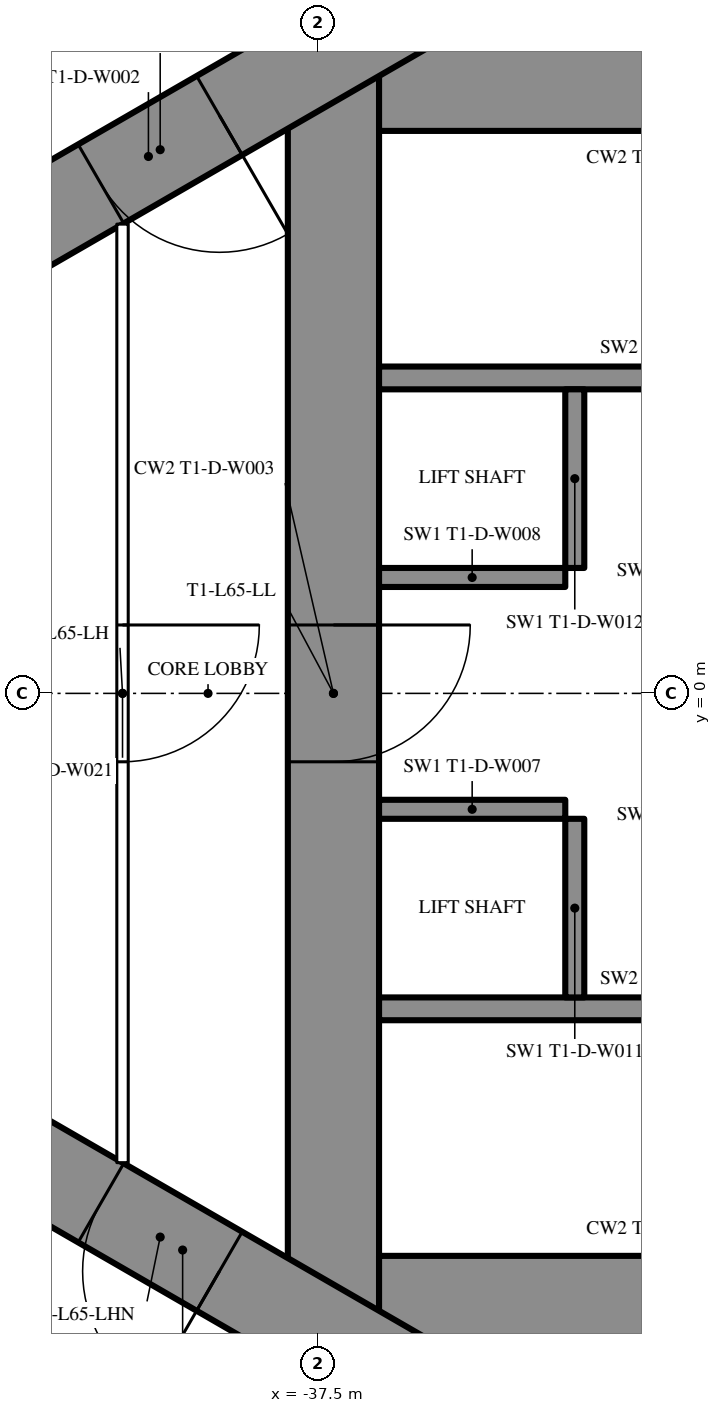
"""IFC4 building model, lengths in metres.
Left out: names, types, materials, properties, quantities, classifications, styles, units other than length and angle.
Written with IfcOpenShell. Run it as: python <this file> out.ifc"""

import sys

from ifc_helpers import new_model, si_unit, direction, frame, frame_2d, origin, place, context, subcontext, project, spatial, rectangle, extrude, element, fill, save


model = new_model("IFC4")
c1 = context("Model", 3, precision=1e-05, world=origin(), true_north=direction((0.0, 1.0)))
c2 = subcontext(c1, "Body", "Model", "MODEL_VIEW")
j1 = project(units=[si_unit("LENGTHUNIT", "METRE"), si_unit("PLANEANGLEUNIT", "RADIAN")], contexts=[c1])
p1 = place(None, origin())
s1 = spatial("IfcSite", under=j1, at=p1, CompositionType="ELEMENT")
p2 = place(p1, origin())
s2 = spatial("IfcBuilding", under=s1, at=p2, CompositionType="ELEMENT")
p3 = place(p2, frame((0.0, 0.0, 244.1)))
s3 = spatial("IfcBuildingStorey", under=s2, at=p3, CompositionType="ELEMENT", Elevation=244.1)
p4 = place(p3, frame((-37.3, 8.6, 0.0), z_axis=(0.0, 0.0, 1.0), x_axis=(0.0, -1.0, 0.0)))
e1 = element("IfcWall", 1, at=p4, inside=s3, PredefinedType="SHEAR", context=c2, shape_type="SweptSolid", body=[
    extrude(rectangle(XDim=17.2, YDim=1.2, at=frame_2d((8.6, 0.0))), origin(), (0.0, 0.0, 1.0), 3.6),
])
p5 = place(p4, frame((7.7, 0.0, 0.0)))
e2 = element("IfcOpeningElement", 2, at=p5, cuts=e1, PredefinedType="OPENING", context=c2, shape_type="SweptSolid", body=[
    extrude(rectangle(XDim=1.8, YDim=2.2, at=frame_2d((0.9, 1.1))), frame((0.0, 0.61, 0.0), z_axis=(0.0, -1.0, 0.0), x_axis=(1.0, 0.0, 0.0)), (0.0, 0.0, 1.0), 1.22),
])
p6 = place(p3, frame((-28.3, 8.0, 0.0), z_axis=(0.0, 0.0, 1.0), x_axis=(-1.0, 0.0, 0.0)))
e3 = element("IfcWall", 3, at=p6, inside=s3, PredefinedType="SHEAR", context=c2, shape_type="SweptSolid", body=[
    extrude(rectangle(XDim=8.4, YDim=1.2, at=frame_2d((4.2, 0.0))), origin(), (0.0, 0.0, 1.0), 3.6),
])
p7 = place(p6, frame((0.25, 0.0, 0.0)))
e4 = element("IfcOpeningElement", 4, at=p7, cuts=e3, PredefinedType="OPENING", context=c2, shape_type="SweptSolid", body=[
    extrude(rectangle(XDim=1.0, YDim=2.2, at=frame_2d((0.5, 1.1))), frame((0.0, 0.61, 0.0), z_axis=(0.0, -1.0, 0.0), x_axis=(1.0, 0.0, 0.0)), (0.0, 0.0, 1.0), 1.22),
])
p8 = place(p3, frame((-28.3, -8.0, 0.0), z_axis=(0.0, 0.0, 1.0), x_axis=(-1.0, 0.0, 0.0)))
e5 = element("IfcWall", 5, at=p8, inside=s3, PredefinedType="SHEAR", context=c2, shape_type="SweptSolid", body=[
    extrude(rectangle(XDim=8.4, YDim=1.2, at=frame_2d((4.2, 0.0))), origin(), (0.0, 0.0, 1.0), 3.6),
])
p9 = place(p8, frame((0.25, 0.0, 0.0)))
e6 = element("IfcOpeningElement", 6, at=p9, cuts=e5, PredefinedType="OPENING", context=c2, shape_type="SweptSolid", body=[
    extrude(rectangle(XDim=1.0, YDim=2.2, at=frame_2d((0.5, 1.1))), frame((0.0, 0.61, 0.0), z_axis=(0.0, -1.0, 0.0), x_axis=(1.0, 0.0, 0.0)), (0.0, 0.0, 1.0), 1.22),
])
for number, where, z_axis, x_axis in (
    (7, (-28.3, 4.15, 0.0), (0.0, 0.0, 1.0), (-1.0, 0.0, 0.0)),
    (8, (-28.3, -4.15, 0.0), (0.0, 0.0, 1.0), (-1.0, 0.0, 0.0)),
):
    element("IfcWall", number, at=place(p3, frame(where, z_axis=z_axis, x_axis=x_axis)), inside=s3, PredefinedType="SHEAR", context=c2, shape_type="SweptSolid", body=[
        extrude(rectangle(XDim=8.4, YDim=0.3, at=frame_2d((4.2, 0.0))), origin(), (0.0, 0.0, 1.0), 3.6),
    ])
p10 = place(p3, frame((-34.125, 4.0, 0.0), z_axis=(0.0, 0.0, 1.0), x_axis=(0.0, -1.0, 0.0)))
e9 = element("IfcWall", 9, at=p10, inside=s3, PredefinedType="SHEAR", context=c2, shape_type="SweptSolid", body=[
    extrude(rectangle(XDim=2.35, YDim=0.25, at=frame_2d((1.175, 0.0))), origin(), (0.0, 0.0, 1.0), 3.6),
])
p11 = place(p3, frame((-34.25, 1.525, 0.0), z_axis=(0.0, 0.0, 1.0), x_axis=(-1.0, 0.0, 0.0)))
e10 = element("IfcWall", 10, at=p11, inside=s3, PredefinedType="SHEAR", context=c2, shape_type="SweptSolid", body=[
    extrude(rectangle(XDim=2.45, YDim=0.25, at=frame_2d((1.225, 0.0))), origin(), (0.0, 0.0, 1.0), 3.6),
])
p12 = place(p3, frame((-34.125, -1.65, 0.0), z_axis=(0.0, 0.0, 1.0), x_axis=(0.0, -1.0, 0.0)))
e11 = element("IfcWall", 11, at=p12, inside=s3, PredefinedType="SHEAR", context=c2, shape_type="SweptSolid", body=[
    extrude(rectangle(XDim=2.35, YDim=0.25, at=frame_2d((1.175, 0.0))), origin(), (0.0, 0.0, 1.0), 3.6),
])
p13 = place(p3, frame((-34.25, -1.525, 0.0), z_axis=(0.0, 0.0, 1.0), x_axis=(-1.0, 0.0, 0.0)))
e12 = element("IfcWall", 12, at=p13, inside=s3, PredefinedType="SHEAR", context=c2, shape_type="SweptSolid", body=[
    extrude(rectangle(XDim=2.45, YDim=0.25, at=frame_2d((1.225, 0.0))), origin(), (0.0, 0.0, 1.0), 3.6),
])
p14 = place(p3, frame((-27.2, 14.3, 0.0), z_axis=(0.0, 0.0, 1.0), x_axis=(-0.866026593062, -0.499997940104, 0.0)))
e13 = element("IfcWall", 13, at=p14, inside=s3, PredefinedType="SHEAR", context=c2, shape_type="SweptSolid", body=[
    extrude(rectangle(XDim=28.946, YDim=1.2, at=frame_2d((14.473, 0.0))), origin(), (0.0, 0.0, 1.0), 3.6),
])
p15 = place(p14, frame((4.6, 0.0, 0.0)))
e14 = element("IfcOpeningElement", 14, at=p15, cuts=e13, PredefinedType="OPENING", context=c2, shape_type="SweptSolid", body=[
    extrude(rectangle(XDim=1.0, YDim=2.2, at=frame_2d((0.5, 1.1))), frame((0.0, 0.61, 0.0), z_axis=(0.0, -1.0, 0.0), x_axis=(1.0, 0.0, 0.0)), (0.0, 0.0, 1.0), 1.22),
])
p16 = place(p14, frame((13.395, 0.0, 0.0)))
e15 = element("IfcOpeningElement", 15, at=p16, cuts=e13, PredefinedType="OPENING", context=c2, shape_type="SweptSolid", body=[
    extrude(rectangle(XDim=1.8, YDim=2.2, at=frame_2d((0.9, 1.1))), frame((0.0, 0.61, 0.0), z_axis=(0.0, -1.0, 0.0), x_axis=(1.0, 0.0, 0.0)), (0.0, 0.0, 1.0), 1.22),
])
p17 = place(p3, frame((-27.2, -14.3, 0.0), z_axis=(0.0, 0.0, 1.0), x_axis=(-0.866024021859, 0.500002393557, 0.0)))
e16 = element("IfcWall", 16, at=p17, inside=s3, PredefinedType="SHEAR", context=c2, shape_type="SweptSolid", body=[
    extrude(rectangle(XDim=27.907, YDim=1.2, at=frame_2d((13.954, 0.0))), origin(), (0.0, 0.0, 1.0), 3.6),
])
p18 = place(p17, frame((4.6, 0.0, 0.0)))
e17 = element("IfcOpeningElement", 17, at=p18, cuts=e16, PredefinedType="OPENING", context=c2, shape_type="SweptSolid", body=[
    extrude(rectangle(XDim=1.0, YDim=2.2, at=frame_2d((0.5, 1.1))), frame((0.0, 0.61, 0.0), z_axis=(0.0, -1.0, 0.0), x_axis=(1.0, 0.0, 0.0)), (0.0, 0.0, 1.0), 1.22),
])
p19 = place(p17, frame((13.395, 0.0, 0.0)))
e18 = element("IfcOpeningElement", 18, at=p19, cuts=e16, PredefinedType="OPENING", context=c2, shape_type="SweptSolid", body=[
    extrude(rectangle(XDim=1.8, YDim=2.2, at=frame_2d((0.9, 1.1))), frame((0.0, 0.61, 0.0), z_axis=(0.0, -1.0, 0.0), x_axis=(1.0, 0.0, 0.0)), (0.0, 0.0, 1.0), 1.22),
])
p20 = place(p3, frame((-28.737, 16.068, 0.0), z_axis=(0.0, 0.0, 1.0), x_axis=(-0.866026057212, -0.499998868229, 0.0)))
e19 = element("IfcWall", 19, at=p20, inside=s3, PredefinedType="PARTITIONING", context=c2, shape_type="SweptSolid", body=[
    extrude(rectangle(XDim=32.137, YDim=0.2, at=frame_2d((16.068, 0.0))), origin(), (0.0, 0.0, 1.0), 3.35),
])
p21 = place(p20, frame((1.08, 0.0, 0.0)))
e20 = element("IfcOpeningElement", 20, at=p21, cuts=e19, PredefinedType="OPENING", context=c2, shape_type="SweptSolid", body=[
    extrude(rectangle(XDim=1.8, YDim=2.04, at=frame_2d((0.9, 1.02))), frame((0.0, 0.11, 0.0), z_axis=(0.0, -1.0, 0.0), x_axis=(1.0, 0.0, 0.0)), (0.0, 0.0, 1.0), 0.22),
])
p22 = place(p20, frame((6.86, 0.0, 0.0)))
e21 = element("IfcOpeningElement", 21, at=p22, cuts=e19, PredefinedType="OPENING", context=c2, shape_type="SweptSolid", body=[
    extrude(rectangle(XDim=1.0, YDim=2.2, at=frame_2d((0.5, 1.1))), frame((0.0, 0.11, 0.0), z_axis=(0.0, -1.0, 0.0), x_axis=(1.0, 0.0, 0.0)), (0.0, 0.0, 1.0), 0.22),
])
p23 = place(p20, frame((18.867, 0.0, 0.0)))
e22 = element("IfcOpeningElement", 22, at=p23, cuts=e19, PredefinedType="OPENING", context=c2, shape_type="SweptSolid", body=[
    extrude(rectangle(XDim=0.95, YDim=2.2, at=frame_2d((0.475, 1.1))), frame((0.0, 0.11, 0.0), z_axis=(0.0, -1.0, 0.0), x_axis=(1.0, 0.0, 0.0)), (0.0, 0.0, 1.0), 0.22),
])
p24 = place(p20, frame((23.015, 0.0, 0.0)))
e23 = element("IfcOpeningElement", 23, at=p24, cuts=e19, PredefinedType="OPENING", context=c2, shape_type="SweptSolid", body=[
    extrude(rectangle(XDim=0.95, YDim=2.2, at=frame_2d((0.475, 1.1))), frame((0.0, 0.11, 0.0), z_axis=(0.0, -1.0, 0.0), x_axis=(1.0, 0.0, 0.0)), (0.0, 0.0, 1.0), 0.22),
])
p25 = place(p20, frame((27.226, 0.0, 0.0)))
e24 = element("IfcOpeningElement", 24, at=p25, cuts=e19, PredefinedType="OPENING", context=c2, shape_type="SweptSolid", body=[
    extrude(rectangle(XDim=1.8, YDim=2.2, at=frame_2d((0.9, 1.1))), frame((0.0, 0.11, 0.0), z_axis=(0.0, -1.0, 0.0), x_axis=(1.0, 0.0, 0.0)), (0.0, 0.0, 1.0), 0.22),
])
p26 = place(p3, frame((-40.075, 6.174, 0.0), z_axis=(0.0, 0.0, 1.0), x_axis=(0.0, -1.0, 0.0)))
e25 = element("IfcWall", 25, at=p26, inside=s3, PredefinedType="PARTITIONING", context=c2, shape_type="SweptSolid", body=[
    extrude(rectangle(XDim=12.348, YDim=0.15, at=frame_2d((6.174, 0.0))), origin(), (0.0, 0.0, 1.0), 3.35),
])
p27 = place(p26, frame((5.274, 0.0, 0.0)))
e26 = element("IfcOpeningElement", 26, at=p27, cuts=e25, PredefinedType="OPENING", context=c2, shape_type="SweptSolid", body=[
    extrude(rectangle(XDim=1.8, YDim=2.2, at=frame_2d((0.9, 1.1))), frame((0.0, 0.085, 0.0), z_axis=(0.0, -1.0, 0.0), x_axis=(1.0, 0.0, 0.0)), (0.0, 0.0, 1.0), 0.17),
])
p28 = place(p3, frame((-39.758, -11.697, 0.0), z_axis=(0.0, 0.0, 1.0), x_axis=(-0.866024194504, 0.500002094529, 0.0)))
e27 = element("IfcWall", 27, at=p28, inside=s3, PredefinedType="PARTITIONING", context=c2, shape_type="SweptSolid", body=[
    extrude(rectangle(XDim=6.6, YDim=0.25, at=frame_2d((3.3, 0.0))), origin(), (0.0, 0.0, 1.0), 3.35),
])
p29 = place(p28, frame((0.75, 0.0, 0.0)))
e28 = element("IfcOpeningElement", 28, at=p29, cuts=e27, PredefinedType="OPENING", context=c2, shape_type="SweptSolid", body=[
    extrude(rectangle(XDim=1.1, YDim=2.2, at=frame_2d((0.55, 1.1))), frame((0.0, 0.135, 0.0), z_axis=(0.0, -1.0, 0.0), x_axis=(1.0, 0.0, 0.0)), (0.0, 0.0, 1.0), 0.27),
])
p30 = place(p28, frame((2.75, 0.0, 0.0)))
e29 = element("IfcOpeningElement", 29, at=p30, cuts=e27, PredefinedType="OPENING", context=c2, shape_type="SweptSolid", body=[
    extrude(rectangle(XDim=1.1, YDim=2.2, at=frame_2d((0.55, 1.1))), frame((0.0, 0.135, 0.0), z_axis=(0.0, -1.0, 0.0), x_axis=(1.0, 0.0, 0.0)), (0.0, 0.0, 1.0), 0.27),
])
p31 = place(p28, frame((4.75, 0.0, 0.0)))
e30 = element("IfcOpeningElement", 30, at=p31, cuts=e27, PredefinedType="OPENING", context=c2, shape_type="SweptSolid", body=[
    extrude(rectangle(XDim=1.1, YDim=2.2, at=frame_2d((0.55, 1.1))), frame((0.0, 0.135, 0.0), z_axis=(0.0, -1.0, 0.0), x_axis=(1.0, 0.0, 0.0)), (0.0, 0.0, 1.0), 0.27),
])
p32 = place(p27, origin())
e31 = element("IfcDoor", 31, at=p32, inside=s3, OperationType="DOUBLE_DOOR_SINGLE_SWING", PredefinedType="DOOR", context=c2, shape_type="SweptSolid", body=[
    extrude(rectangle(XDim=1.8, YDim=2.2, at=frame_2d((0.9, 1.1))), frame((0.0, 0.025, 0.0), z_axis=(0.0, -1.0, 0.0), x_axis=(1.0, 0.0, 0.0)), (0.0, 0.0, 1.0), 0.05),
])
fill(e26, e31)
p33 = place(p16, origin())
e32 = element("IfcDoor", 32, at=p33, inside=s3, OperationType="DOUBLE_DOOR_SINGLE_SWING", PredefinedType="DOOR", context=c2, shape_type="SweptSolid", body=[
    extrude(rectangle(XDim=1.8, YDim=2.2, at=frame_2d((0.9, 1.1))), frame((0.0, 0.025, 0.0), z_axis=(0.0, -1.0, 0.0), x_axis=(1.0, 0.0, 0.0)), (0.0, 0.0, 1.0), 0.05),
])
fill(e15, e32)
p34 = place(p19, origin())
e33 = element("IfcDoor", 33, at=p34, inside=s3, OperationType="DOUBLE_DOOR_SINGLE_SWING", PredefinedType="DOOR", context=c2, shape_type="SweptSolid", body=[
    extrude(rectangle(XDim=1.8, YDim=2.2, at=frame_2d((0.9, 1.1))), frame((0.0, 0.025, 0.0), z_axis=(0.0, -1.0, 0.0), x_axis=(1.0, 0.0, 0.0)), (0.0, 0.0, 1.0), 0.05),
])
fill(e18, e33)
p35 = place(p5, origin())
e34 = element("IfcDoor", 34, at=p35, inside=s3, OperationType="DOUBLE_DOOR_SINGLE_SWING", PredefinedType="DOOR", context=c2, shape_type="SweptSolid", body=[
    extrude(rectangle(XDim=1.8, YDim=2.2, at=frame_2d((0.9, 1.1))), frame((0.0, 0.025, 0.0), z_axis=(0.0, -1.0, 0.0), x_axis=(1.0, 0.0, 0.0)), (0.0, 0.0, 1.0), 0.05),
])
fill(e2, e34)
save(model, sys.argv[1])
